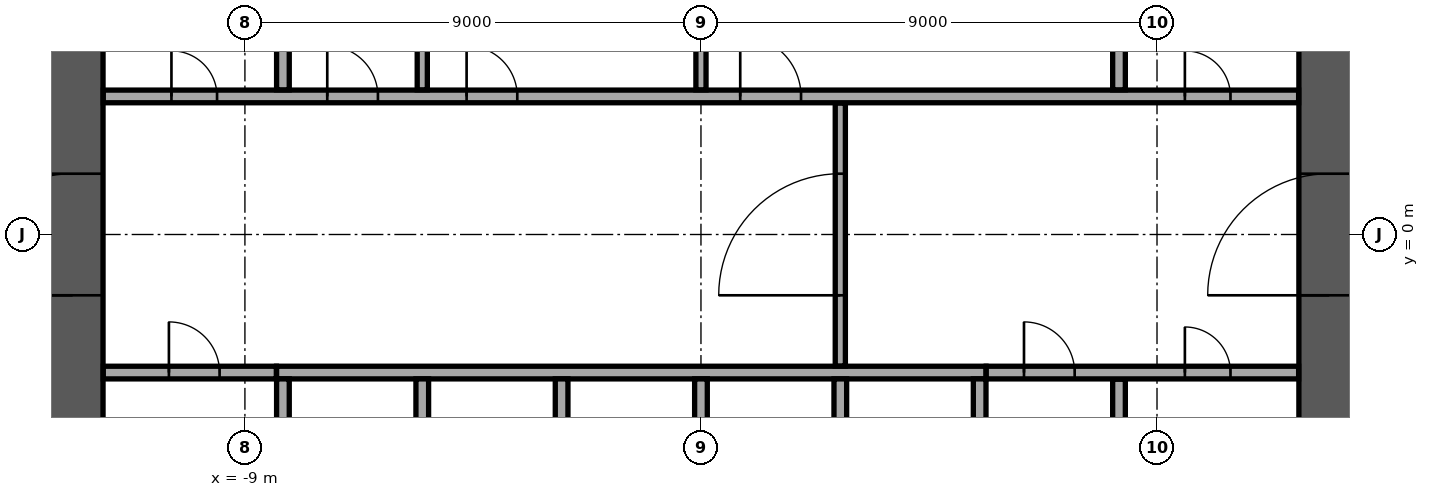
"""IFC4 building model, lengths in metres.
Left out: names, types, materials, properties, quantities, classifications, styles, units other than length and angle.
Written with IfcOpenShell. Run it as: python <this file> out.ifc"""

import sys

from ifc_helpers import new_model, si_unit, direction, frame, frame_2d, origin, place, context, subcontext, project, spatial, rectangle, extrude, element, fill, save


model = new_model("IFC4")
c1 = context("Model", 3, precision=1e-05, world=origin(), true_north=direction((0.0, 1.0)))
c2 = subcontext(c1, "Body", "Model", "MODEL_VIEW")
j1 = project(units=[si_unit("LENGTHUNIT", "METRE"), si_unit("PLANEANGLEUNIT", "RADIAN")], contexts=[c1])
p1 = place(None, origin())
s1 = spatial("IfcSite", under=j1, at=p1, CompositionType="ELEMENT")
p2 = place(p1, origin())
s2 = spatial("IfcBuilding", under=s1, at=p2, CompositionType="ELEMENT")
p3 = place(p2, frame((0.0, 0.0, 22.5)))
s3 = spatial("IfcBuildingStorey", under=s2, at=p3, CompositionType="ELEMENT", Elevation=22.5)
p4 = place(p3, frame((12.4, -11.8, 0.0), z_axis=(0.0, 0.0, 1.0), x_axis=(0.0, 1.0, 0.0)))
e1 = element("IfcWall", 1, at=p4, inside=s3, PredefinedType="SHEAR", context=c2, shape_type="SweptSolid", body=[
    extrude(rectangle(XDim=23.6, YDim=1.2, at=frame_2d((11.8, 0.0))), origin(), (0.0, 0.0, 1.0), 4.35),
])
p5 = place(p4, frame((10.6, 0.0, 0.0)))
e2 = element("IfcOpeningElement", 2, at=p5, cuts=e1, PredefinedType="OPENING", context=c2, shape_type="SweptSolid", body=[
    extrude(rectangle(XDim=2.4, YDim=2.4, at=frame_2d((1.2, 1.2))), frame((0.0, 0.61, 0.0), z_axis=(0.0, -1.0, 0.0), x_axis=(1.0, 0.0, 0.0)), (0.0, 0.0, 1.0), 1.22),
])
p6 = place(p3, frame((-12.4, -11.8, 0.0), z_axis=(0.0, 0.0, 1.0), x_axis=(0.0, 1.0, 0.0)))
e3 = element("IfcWall", 3, at=p6, inside=s3, PredefinedType="SHEAR", context=c2, shape_type="SweptSolid", body=[
    extrude(rectangle(XDim=23.6, YDim=1.2, at=frame_2d((11.8, 0.0))), origin(), (0.0, 0.0, 1.0), 4.35),
])
p7 = place(p6, frame((10.6, 0.0, 0.0)))
e4 = element("IfcOpeningElement", 4, at=p7, cuts=e3, PredefinedType="OPENING", context=c2, shape_type="SweptSolid", body=[
    extrude(rectangle(XDim=2.4, YDim=2.4, at=frame_2d((1.2, 1.2))), frame((0.0, 0.61, 0.0), z_axis=(0.0, -1.0, 0.0), x_axis=(1.0, 0.0, 0.0)), (0.0, 0.0, 1.0), 1.22),
])
p8 = place(p3, frame((-8.375, -2.725, 0.0), z_axis=(0.0, 0.0, 1.0), x_axis=(1.0, 0.0, 0.0)))
e5 = element("IfcWall", 5, at=p8, inside=s3, PredefinedType="SOLIDWALL", context=c2, shape_type="SweptSolid", body=[
    extrude(rectangle(XDim=14.0, YDim=0.25, at=frame_2d((7.0, 0.0))), origin(), (0.0, 0.0, 1.0), 4.35),
])
for number, where, z_axis, x_axis in (
    (6, (-8.25, -5.55, 0.0), (0.0, 0.0, 1.0), (0.0, 1.0, 0.0)),
    (7, (-5.5, -5.55, 0.0), (0.0, 0.0, 1.0), (0.0, 1.0, 0.0)),
    (8, (-2.75, -5.55, 0.0), (0.0, 0.0, 1.0), (0.0, 1.0, 0.0)),
    (9, (0.0, -5.55, 0.0), (0.0, 0.0, 1.0), (0.0, 1.0, 0.0)),
    (10, (2.75, -5.55, 0.0), (0.0, 0.0, 1.0), (0.0, 1.0, 0.0)),
    (11, (5.5, -5.55, 0.0), (0.0, 0.0, 1.0), (0.0, 1.0, 0.0)),
):
    element("IfcWall", number, at=place(p3, frame(where, z_axis=z_axis, x_axis=x_axis)), inside=s3, PredefinedType="SOLIDWALL", context=c2, shape_type="SweptSolid", body=[
        extrude(rectangle(XDim=2.7, YDim=0.25, at=frame_2d((1.35, 0.0))), origin(), (0.0, 0.0, 1.0), 4.35),
    ])
p9 = place(p3, frame((8.25, -5.545, 0.0), z_axis=(0.0, 0.0, 1.0), x_axis=(0.0, 1.0, 0.0)))
e12 = element("IfcWall", 12, at=p9, inside=s3, PredefinedType="PARTITIONING", context=c2, shape_type="SweptSolid", body=[
    extrude(rectangle(XDim=2.69, YDim=0.25, at=frame_2d((1.345, 0.0))), origin(), (0.0, 0.0, 1.0), 4.35),
])
p10 = place(p3, frame((-11.795, -2.725, 0.0), z_axis=(0.0, 0.0, 1.0), x_axis=(1.0, 0.0, 0.0)))
e13 = element("IfcWall", 13, at=p10, inside=s3, PredefinedType="PARTITIONING", context=c2, shape_type="SweptSolid", body=[
    extrude(rectangle(XDim=3.415, YDim=0.25, at=frame_2d((1.708, 0.0))), origin(), (0.0, 0.0, 1.0), 4.35),
])
p11 = place(p10, frame((1.295, 0.0, 0.0)))
e14 = element("IfcOpeningElement", 14, at=p11, cuts=e13, PredefinedType="OPENING", context=c2, shape_type="SweptSolid", body=[
    extrude(rectangle(XDim=1.0, YDim=2.1, at=frame_2d((0.5, 1.05))), frame((0.0, 0.135, 0.0), z_axis=(0.0, -1.0, 0.0), x_axis=(1.0, 0.0, 0.0)), (0.0, 0.0, 1.0), 0.27),
])
p12 = place(p3, frame((5.63, -2.725, 0.0), z_axis=(0.0, 0.0, 1.0), x_axis=(1.0, 0.0, 0.0)))
e15 = element("IfcWall", 15, at=p12, inside=s3, PredefinedType="PARTITIONING", context=c2, shape_type="SweptSolid", body=[
    extrude(rectangle(XDim=6.165, YDim=0.25, at=frame_2d((3.083, 0.0))), origin(), (0.0, 0.0, 1.0), 4.35),
])
p13 = place(p12, frame((0.745, 0.0, 0.0)))
e16 = element("IfcOpeningElement", 16, at=p13, cuts=e15, PredefinedType="OPENING", context=c2, shape_type="SweptSolid", body=[
    extrude(rectangle(XDim=1.0, YDim=2.1, at=frame_2d((0.5, 1.05))), frame((0.0, 0.135, 0.0), z_axis=(0.0, -1.0, 0.0), x_axis=(1.0, 0.0, 0.0)), (0.0, 0.0, 1.0), 0.27),
])
p14 = place(p12, frame((3.92, 0.0, 0.0)))
e17 = element("IfcOpeningElement", 17, at=p14, cuts=e15, PredefinedType="OPENING", context=c2, shape_type="SweptSolid", body=[
    extrude(rectangle(XDim=0.9, YDim=2.1, at=frame_2d((0.45, 1.05))), frame((0.0, 0.135, 0.0), z_axis=(0.0, -1.0, 0.0), x_axis=(1.0, 0.0, 0.0)), (0.0, 0.0, 1.0), 0.27),
])
p15 = place(p3, frame((2.75, -2.595, 0.0), z_axis=(0.0, 0.0, 1.0), x_axis=(0.0, 1.0, 0.0)))
e18 = element("IfcWall", 18, at=p15, inside=s3, PredefinedType="PARTITIONING", context=c2, shape_type="SweptSolid", body=[
    extrude(rectangle(XDim=5.19, YDim=0.2, at=frame_2d((2.595, 0.0))), origin(), (0.0, 0.0, 1.0), 4.35),
])
p16 = place(p15, frame((1.395, 0.0, 0.0)))
e19 = element("IfcOpeningElement", 19, at=p16, cuts=e18, PredefinedType="OPENING", context=c2, shape_type="SweptSolid", body=[
    extrude(rectangle(XDim=2.4, YDim=2.4, at=frame_2d((1.2, 1.2))), frame((0.0, 0.11, 0.0), z_axis=(0.0, -1.0, 0.0), x_axis=(1.0, 0.0, 0.0)), (0.0, 0.0, 1.0), 0.22),
])
p17 = place(p3, frame((-11.795, 2.725, 0.0), z_axis=(0.0, 0.0, 1.0), x_axis=(1.0, 0.0, 0.0)))
e20 = element("IfcWall", 20, at=p17, inside=s3, PredefinedType="PARTITIONING", context=c2, shape_type="SweptSolid", body=[
    extrude(rectangle(XDim=23.59, YDim=0.25, at=frame_2d((11.795, 0.0))), origin(), (0.0, 0.0, 1.0), 4.35),
])
p18 = place(p17, frame((21.345, 0.0, 0.0)))
e21 = element("IfcOpeningElement", 21, at=p18, cuts=e20, PredefinedType="OPENING", context=c2, shape_type="SweptSolid", body=[
    extrude(rectangle(XDim=0.9, YDim=2.1, at=frame_2d((0.45, 1.05))), frame((0.0, 0.135, 0.0), z_axis=(0.0, -1.0, 0.0), x_axis=(1.0, 0.0, 0.0)), (0.0, 0.0, 1.0), 0.27),
])
p19 = place(p17, frame((1.345, 0.0, 0.0)))
e22 = element("IfcOpeningElement", 22, at=p19, cuts=e20, PredefinedType="OPENING", context=c2, shape_type="SweptSolid", body=[
    extrude(rectangle(XDim=0.9, YDim=2.1, at=frame_2d((0.45, 1.05))), frame((0.0, 0.135, 0.0), z_axis=(0.0, -1.0, 0.0), x_axis=(1.0, 0.0, 0.0)), (0.0, 0.0, 1.0), 0.27),
])
p20 = place(p17, frame((4.42, 0.0, 0.0)))
e23 = element("IfcOpeningElement", 23, at=p20, cuts=e20, PredefinedType="OPENING", context=c2, shape_type="SweptSolid", body=[
    extrude(rectangle(XDim=1.0, YDim=2.1, at=frame_2d((0.5, 1.05))), frame((0.0, 0.135, 0.0), z_axis=(0.0, -1.0, 0.0), x_axis=(1.0, 0.0, 0.0)), (0.0, 0.0, 1.0), 0.27),
])
p21 = place(p17, frame((7.17, 0.0, 0.0)))
e24 = element("IfcOpeningElement", 24, at=p21, cuts=e20, PredefinedType="OPENING", context=c2, shape_type="SweptSolid", body=[
    extrude(rectangle(XDim=1.0, YDim=2.1, at=frame_2d((0.5, 1.05))), frame((0.0, 0.135, 0.0), z_axis=(0.0, -1.0, 0.0), x_axis=(1.0, 0.0, 0.0)), (0.0, 0.0, 1.0), 0.27),
])
p22 = place(p17, frame((12.57, 0.0, 0.0)))
e25 = element("IfcOpeningElement", 25, at=p22, cuts=e20, PredefinedType="OPENING", context=c2, shape_type="SweptSolid", body=[
    extrude(rectangle(XDim=1.2, YDim=2.1, at=frame_2d((0.6, 1.05))), frame((0.0, 0.135, 0.0), z_axis=(0.0, -1.0, 0.0), x_axis=(1.0, 0.0, 0.0)), (0.0, 0.0, 1.0), 0.27),
])
p23 = place(p3, frame((-8.25, 2.855, 0.0), z_axis=(0.0, 0.0, 1.0), x_axis=(0.0, 1.0, 0.0)))
e26 = element("IfcWall", 26, at=p23, inside=s3, PredefinedType="PARTITIONING", context=c2, shape_type="SweptSolid", body=[
    extrude(rectangle(XDim=1.715, YDim=0.25, at=frame_2d((0.857, 0.0))), origin(), (0.0, 0.0, 1.0), 4.35),
])
for number, where, z_axis, x_axis in (
    (27, (-5.5, 2.855, 0.0), (0.0, 0.0, 1.0), (0.0, 1.0, 0.0)),
    (28, (0.0, 2.855, 0.0), (0.0, 0.0, 1.0), (0.0, 1.0, 0.0)),
):
    element("IfcWall", number, at=place(p3, frame(where, z_axis=z_axis, x_axis=x_axis)), inside=s3, PredefinedType="PARTITIONING", context=c2, shape_type="SweptSolid", body=[
        extrude(rectangle(XDim=2.69, YDim=0.2, at=frame_2d((1.345, 0.0))), origin(), (0.0, 0.0, 1.0), 4.35),
    ])
p24 = place(p3, frame((8.25, 2.855, 0.0), z_axis=(0.0, 0.0, 1.0), x_axis=(0.0, 1.0, 0.0)))
e29 = element("IfcWall", 29, at=p24, inside=s3, PredefinedType="PARTITIONING", context=c2, shape_type="SweptSolid", body=[
    extrude(rectangle(XDim=2.69, YDim=0.25, at=frame_2d((1.345, 0.0))), origin(), (0.0, 0.0, 1.0), 4.35),
])
p25 = place(p5, origin())
e30 = element("IfcDoor", 30, at=p25, inside=s3, OperationType="SINGLE_SWING_LEFT", PredefinedType="DOOR", context=c2, shape_type="SweptSolid", body=[
    extrude(rectangle(XDim=2.4, YDim=2.4, at=frame_2d((1.2, 1.2))), frame((0.0, 0.025, 0.0), z_axis=(0.0, -1.0, 0.0), x_axis=(1.0, 0.0, 0.0)), (0.0, 0.0, 1.0), 0.05),
])
fill(e2, e30)
p26 = place(p7, origin())
e31 = element("IfcDoor", 31, at=p26, inside=s3, OperationType="SINGLE_SWING_LEFT", PredefinedType="DOOR", context=c2, shape_type="SweptSolid", body=[
    extrude(rectangle(XDim=2.4, YDim=2.4, at=frame_2d((1.2, 1.2))), frame((0.0, 0.025, 0.0), z_axis=(0.0, -1.0, 0.0), x_axis=(1.0, 0.0, 0.0)), (0.0, 0.0, 1.0), 0.05),
])
fill(e4, e31)
p27 = place(p11, origin())
e32 = element("IfcDoor", 32, at=p27, inside=s3, OperationType="SINGLE_SWING_RIGHT", PredefinedType="DOOR", context=c2, shape_type="SweptSolid", body=[
    extrude(rectangle(XDim=1.0, YDim=2.1, at=frame_2d((0.5, 1.05))), frame((0.0, 0.025, 0.0), z_axis=(0.0, -1.0, 0.0), x_axis=(1.0, 0.0, 0.0)), (0.0, 0.0, 1.0), 0.05),
])
fill(e14, e32)
p28 = place(p13, origin())
e33 = element("IfcDoor", 33, at=p28, inside=s3, OperationType="SINGLE_SWING_RIGHT", PredefinedType="DOOR", context=c2, shape_type="SweptSolid", body=[
    extrude(rectangle(XDim=1.0, YDim=2.1, at=frame_2d((0.5, 1.05))), frame((0.0, 0.025, 0.0), z_axis=(0.0, -1.0, 0.0), x_axis=(1.0, 0.0, 0.0)), (0.0, 0.0, 1.0), 0.05),
])
fill(e16, e33)
p29 = place(p18, origin())
e34 = element("IfcDoor", 34, at=p29, inside=s3, OperationType="SINGLE_SWING_RIGHT", PredefinedType="DOOR", context=c2, shape_type="SweptSolid", body=[
    extrude(rectangle(XDim=0.9, YDim=2.1, at=frame_2d((0.45, 1.05))), frame((0.0, 0.025, 0.0), z_axis=(0.0, -1.0, 0.0), x_axis=(1.0, 0.0, 0.0)), (0.0, 0.0, 1.0), 0.05),
])
fill(e21, e34)
p30 = place(p14, origin())
e35 = element("IfcDoor", 35, at=p30, inside=s3, OperationType="SINGLE_SWING_RIGHT", PredefinedType="DOOR", context=c2, shape_type="SweptSolid", body=[
    extrude(rectangle(XDim=0.9, YDim=2.1, at=frame_2d((0.45, 1.05))), frame((0.0, 0.025, 0.0), z_axis=(0.0, -1.0, 0.0), x_axis=(1.0, 0.0, 0.0)), (0.0, 0.0, 1.0), 0.05),
])
fill(e17, e35)
p31 = place(p19, origin())
e36 = element("IfcDoor", 36, at=p31, inside=s3, OperationType="SINGLE_SWING_RIGHT", PredefinedType="DOOR", context=c2, shape_type="SweptSolid", body=[
    extrude(rectangle(XDim=0.9, YDim=2.1, at=frame_2d((0.45, 1.05))), frame((0.0, 0.025, 0.0), z_axis=(0.0, -1.0, 0.0), x_axis=(1.0, 0.0, 0.0)), (0.0, 0.0, 1.0), 0.05),
])
fill(e22, e36)
p32 = place(p20, origin())
e37 = element("IfcDoor", 37, at=p32, inside=s3, OperationType="SINGLE_SWING_RIGHT", PredefinedType="DOOR", context=c2, shape_type="SweptSolid", body=[
    extrude(rectangle(XDim=1.0, YDim=2.1, at=frame_2d((0.5, 1.05))), frame((0.0, 0.025, 0.0), z_axis=(0.0, -1.0, 0.0), x_axis=(1.0, 0.0, 0.0)), (0.0, 0.0, 1.0), 0.05),
])
fill(e23, e37)
p33 = place(p21, origin())
e38 = element("IfcDoor", 38, at=p33, inside=s3, OperationType="SINGLE_SWING_RIGHT", PredefinedType="DOOR", context=c2, shape_type="SweptSolid", body=[
    extrude(rectangle(XDim=1.0, YDim=2.1, at=frame_2d((0.5, 1.05))), frame((0.0, 0.025, 0.0), z_axis=(0.0, -1.0, 0.0), x_axis=(1.0, 0.0, 0.0)), (0.0, 0.0, 1.0), 0.05),
])
fill(e24, e38)
p34 = place(p22, origin())
e39 = element("IfcDoor", 39, at=p34, inside=s3, OperationType="SINGLE_SWING_LEFT", PredefinedType="DOOR", context=c2, shape_type="SweptSolid", body=[
    extrude(rectangle(XDim=1.2, YDim=2.1, at=frame_2d((0.6, 1.05))), frame((0.0, 0.025, 0.0), z_axis=(0.0, -1.0, 0.0), x_axis=(1.0, 0.0, 0.0)), (0.0, 0.0, 1.0), 0.05),
])
fill(e25, e39)
p35 = place(p16, origin())
e40 = element("IfcDoor", 40, at=p35, inside=s3, OperationType="DOUBLE_DOOR_DOUBLE_SWING", PredefinedType="DOOR", context=c2, shape_type="SweptSolid", body=[
    extrude(rectangle(XDim=2.4, YDim=2.4, at=frame_2d((1.2, 1.2))), frame((0.0, 0.025, 0.0), z_axis=(0.0, -1.0, 0.0), x_axis=(1.0, 0.0, 0.0)), (0.0, 0.0, 1.0), 0.05),
])
fill(e19, e40)
save(model, sys.argv[1])
